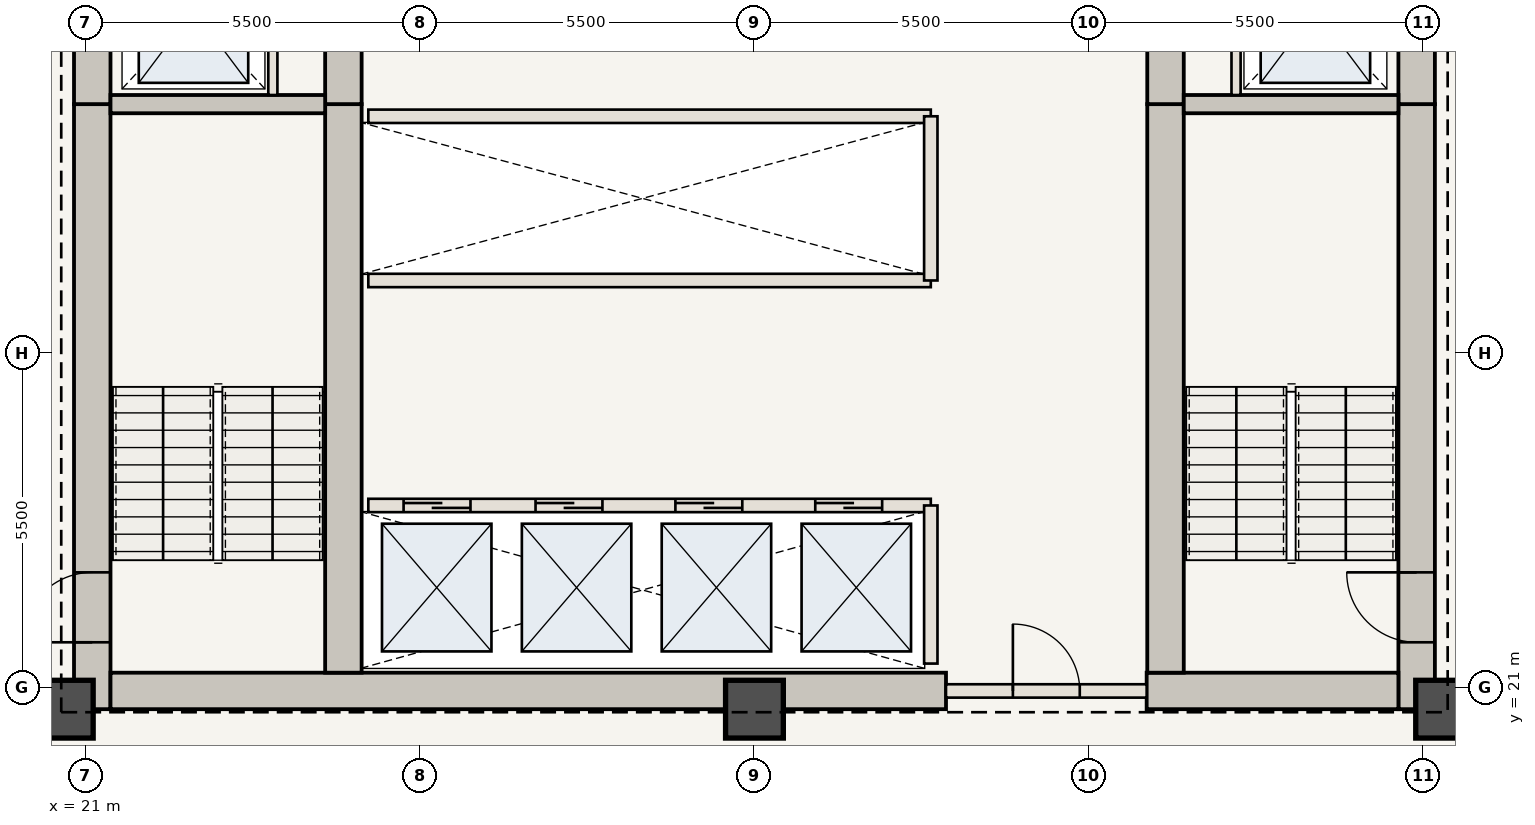
"""IFC4 building model, lengths in metres.
Left out: names, types, materials, properties, quantities, classifications, styles, units other than length and angle.
Written with IfcOpenShell. Run it as: python <this file> out.ifc"""

import sys

from ifc_helpers import new_model, si_unit, direction, frame, frame_2d, origin, origin_2d, place, context, subcontext, project, spatial, rectangle, extrude, element, fill, save


model = new_model("IFC4")
c1 = context("Model", 3, precision=1e-05, world=origin(), true_north=direction((0.0, 1.0)))
c2 = subcontext(c1, "Body", "Model", "MODEL_VIEW")
j1 = project(units=[si_unit("LENGTHUNIT", "METRE"), si_unit("PLANEANGLEUNIT", "RADIAN")], contexts=[c1])
p1 = place(None, origin())
s1 = spatial("IfcSite", under=j1, at=p1, CompositionType="ELEMENT")
p2 = place(p1, origin())
s2 = spatial("IfcBuilding", under=s1, at=p2, CompositionType="ELEMENT")
p3 = place(p2, frame((0.0, 0.0, 126.0)))
s3 = spatial("IfcBuildingStorey", under=s2, at=p3, CompositionType="ELEMENT", Elevation=126.0)
p4 = place(p3, frame((21.11, 20.65, 0.0), z_axis=(0.0, 0.0, 1.0), x_axis=(0.0, 1.0, 0.0)))
e1 = element("IfcWall", 1, at=p4, inside=s3, PredefinedType="SHEAR", context=c2, shape_type="SweptSolid", body=[
    extrude(rectangle(XDim=9.95, YDim=0.6, at=frame_2d((4.975, 0.0))), origin(), (0.0, 0.0, 1.0), 3.85),
])
p5 = place(p4, frame((1.1, 0.0, 0.0)))
e2 = element("IfcOpeningElement", 2, at=p5, cuts=e1, PredefinedType="OPENING", context=c2, shape_type="SweptSolid", body=[
    extrude(rectangle(XDim=1.15, YDim=2.15, at=frame_2d((0.575, 1.075))), frame((0.0, 0.31, 0.0), z_axis=(0.0, -1.0, 0.0), x_axis=(1.0, 0.0, 0.0)), (0.0, 0.0, 1.0), 0.62),
])
p6 = place(p3, frame((21.11, 30.6, 0.0), z_axis=(0.0, 0.0, 1.0), x_axis=(0.0, 1.0, 0.0)))
e3 = element("IfcWall", 3, at=p6, inside=s3, PredefinedType="SHEAR", context=c2, shape_type="SweptSolid", body=[
    extrude(rectangle(XDim=12.7, YDim=0.6, at=frame_2d((6.35, 0.0))), origin(), (0.0, 0.0, 1.0), 3.85),
])
p7 = place(p6, frame((4.2, 0.0, 0.0)))
e4 = element("IfcOpeningElement", 4, at=p7, cuts=e3, PredefinedType="OPENING", context=c2, shape_type="SweptSolid", body=[
    extrude(rectangle(XDim=1.1, YDim=2.15, at=frame_2d((0.55, 1.075))), frame((0.0, 0.31, 0.0), z_axis=(0.0, -1.0, 0.0), x_axis=(1.0, 0.0, 0.0)), (0.0, 0.0, 1.0), 0.62),
])
p8 = place(p6, frame((9.2, 0.0, 0.0)))
e5 = element("IfcOpeningElement", 5, at=p8, cuts=e3, PredefinedType="OPENING", context=c2, shape_type="SweptSolid", body=[
    extrude(rectangle(XDim=0.92, YDim=2.1, at=frame_2d((0.46, 1.05))), frame((0.0, 0.31, 0.0), z_axis=(0.0, -1.0, 0.0), x_axis=(1.0, 0.0, 0.0)), (0.0, 0.0, 1.0), 0.62),
])
p9 = place(p3, frame((42.89, 20.65, 0.0), z_axis=(0.0, 0.0, 1.0), x_axis=(0.0, 1.0, 0.0)))
e6 = element("IfcWall", 6, at=p9, inside=s3, PredefinedType="SHEAR", context=c2, shape_type="SweptSolid", body=[
    extrude(rectangle(XDim=9.95, YDim=0.6, at=frame_2d((4.975, 0.0))), origin(), (0.0, 0.0, 1.0), 3.85),
])
p10 = place(p9, frame((1.1, 0.0, 0.0)))
e7 = element("IfcOpeningElement", 7, at=p10, cuts=e6, PredefinedType="OPENING", context=c2, shape_type="SweptSolid", body=[
    extrude(rectangle(XDim=1.15, YDim=2.15, at=frame_2d((0.575, 1.075))), frame((0.0, 0.31, 0.0), z_axis=(0.0, -1.0, 0.0), x_axis=(1.0, 0.0, 0.0)), (0.0, 0.0, 1.0), 0.62),
])
p11 = place(p3, frame((42.89, 30.6, 0.0), z_axis=(0.0, 0.0, 1.0), x_axis=(0.0, 1.0, 0.0)))
e8 = element("IfcWall", 8, at=p11, inside=s3, PredefinedType="SHEAR", context=c2, shape_type="SweptSolid", body=[
    extrude(rectangle(XDim=12.7, YDim=0.6, at=frame_2d((6.35, 0.0))), origin(), (0.0, 0.0, 1.0), 3.85),
])
p12 = place(p11, frame((4.2, 0.0, 0.0)))
e9 = element("IfcOpeningElement", 9, at=p12, cuts=e8, PredefinedType="OPENING", context=c2, shape_type="SweptSolid", body=[
    extrude(rectangle(XDim=1.1, YDim=2.15, at=frame_2d((0.55, 1.075))), frame((0.0, 0.31, 0.0), z_axis=(0.0, -1.0, 0.0), x_axis=(1.0, 0.0, 0.0)), (0.0, 0.0, 1.0), 0.62),
])
p13 = place(p11, frame((8.05, 0.0, 0.0)))
e10 = element("IfcOpeningElement", 10, at=p13, cuts=e8, PredefinedType="OPENING", context=c2, shape_type="SweptSolid", body=[
    extrude(rectangle(XDim=0.88, YDim=2.1, at=frame_2d((0.44, 1.05))), frame((0.0, 0.31, 0.0), z_axis=(0.0, -1.0, 0.0), x_axis=(1.0, 0.0, 0.0)), (0.0, 0.0, 1.0), 0.62),
])
p14 = place(p11, frame((9.45, 0.0, 0.0)))
e11 = element("IfcOpeningElement", 11, at=p14, cuts=e8, PredefinedType="OPENING", context=c2, shape_type="SweptSolid", body=[
    extrude(rectangle(XDim=0.88, YDim=2.1, at=frame_2d((0.44, 1.05))), frame((0.0, 0.31, 0.0), z_axis=(0.0, -1.0, 0.0), x_axis=(1.0, 0.0, 0.0)), (0.0, 0.0, 1.0), 0.62),
])
p15 = place(p11, frame((10.85, 0.0, 0.0)))
e12 = element("IfcOpeningElement", 12, at=p15, cuts=e8, PredefinedType="OPENING", context=c2, shape_type="SweptSolid", body=[
    extrude(rectangle(XDim=0.88, YDim=2.1, at=frame_2d((0.44, 1.05))), frame((0.0, 0.31, 0.0), z_axis=(0.0, -1.0, 0.0), x_axis=(1.0, 0.0, 0.0)), (0.0, 0.0, 1.0), 0.62),
])
p16 = place(p3, frame((21.41, 20.95, 0.0), z_axis=(0.0, 0.0, 1.0), x_axis=(1.0, 0.0, 0.0)))
e13 = element("IfcWall", 13, at=p16, inside=s3, PredefinedType="SHEAR", context=c2, shape_type="SweptSolid", body=[
    extrude(rectangle(XDim=13.74, YDim=0.6, at=frame_2d((6.87, 0.0))), origin(), (0.0, 0.0, 1.0), 3.85),
])
p17 = place(p3, frame((38.45, 20.95, 0.0), z_axis=(0.0, 0.0, 1.0), x_axis=(1.0, 0.0, 0.0)))
e14 = element("IfcWall", 14, at=p17, inside=s3, PredefinedType="SHEAR", context=c2, shape_type="SweptSolid", body=[
    extrude(rectangle(XDim=4.14, YDim=0.6, at=frame_2d((2.07, 0.0))), origin(), (0.0, 0.0, 1.0), 3.85),
])
p18 = place(p3, frame((25.24, 21.25, 0.0), z_axis=(0.0, 0.0, 1.0), x_axis=(0.0, 1.0, 0.0)))
e15 = element("IfcWall", 15, at=p18, inside=s3, PredefinedType="SHEAR", context=c2, shape_type="SweptSolid", body=[
    extrude(rectangle(XDim=9.35, YDim=0.6, at=frame_2d((4.675, 0.0))), origin(), (0.0, 0.0, 1.0), 3.85),
])
p19 = place(p3, frame((25.24, 30.6, 0.0), z_axis=(0.0, 0.0, 1.0), x_axis=(0.0, 1.0, 0.0)))
e16 = element("IfcWall", 16, at=p19, inside=s3, PredefinedType="SHEAR", context=c2, shape_type="SweptSolid", body=[
    extrude(rectangle(XDim=12.1, YDim=0.6, at=frame_2d((6.05, 0.0))), origin(), (0.0, 0.0, 1.0), 3.85),
])
p20 = place(p19, frame((6.25, 0.0, 0.0)))
e17 = element("IfcOpeningElement", 17, at=p20, cuts=e16, PredefinedType="OPENING", context=c2, shape_type="SweptSolid", body=[
    extrude(rectangle(XDim=1.1, YDim=2.15, at=frame_2d((0.55, 1.075))), frame((0.0, 0.31, 0.0), z_axis=(0.0, -1.0, 0.0), x_axis=(1.0, 0.0, 0.0)), (0.0, 0.0, 1.0), 0.62),
])
p21 = place(p3, frame((38.76, 21.25, 0.0), z_axis=(0.0, 0.0, 1.0), x_axis=(0.0, 1.0, 0.0)))
e18 = element("IfcWall", 18, at=p21, inside=s3, PredefinedType="SHEAR", context=c2, shape_type="SweptSolid", body=[
    extrude(rectangle(XDim=9.35, YDim=0.6, at=frame_2d((4.675, 0.0))), origin(), (0.0, 0.0, 1.0), 3.85),
])
p22 = place(p3, frame((38.76, 30.6, 0.0), z_axis=(0.0, 0.0, 1.0), x_axis=(0.0, 1.0, 0.0)))
e19 = element("IfcWall", 19, at=p22, inside=s3, PredefinedType="SHEAR", context=c2, shape_type="SweptSolid", body=[
    extrude(rectangle(XDim=12.1, YDim=0.6, at=frame_2d((6.05, 0.0))), origin(), (0.0, 0.0, 1.0), 3.85),
])
for number, where, z_axis, x_axis in (
    (20, (20.65, 20.65, 0.0), (0.0, 0.0, 1.0), (1.0, 0.0, 0.0)),
    (21, (32.0, 20.65, 0.0), (0.0, 0.0, 1.0), (1.0, 0.0, 0.0)),
    (22, (43.35, 20.65, 0.0), (0.0, 0.0, 1.0), (1.0, 0.0, 0.0)),
):
    element("IfcColumn", number, at=place(p3, frame(where, z_axis=z_axis, x_axis=x_axis)), inside=s3, PredefinedType="COLUMN", context=c2, shape_type="SweptSolid", body=[
        extrude(rectangle(XDim=0.95, YDim=0.95, at=origin_2d()), origin(), (0.0, 0.0, 1.0), 3.85),
    ])
for number, where, z_axis, x_axis in (
    (23, (21.41, 30.6, 0.0), (0.0, 0.0, 1.0), (1.0, 0.0, 0.0)),
    (24, (39.06, 30.6, 0.0), (0.0, 0.0, 1.0), (1.0, 0.0, 0.0)),
):
    element("IfcWall", number, at=place(p3, frame(where, z_axis=z_axis, x_axis=x_axis)), inside=s3, PredefinedType="SHEAR", context=c2, shape_type="SweptSolid", body=[
        extrude(rectangle(XDim=3.53, YDim=0.3, at=frame_2d((1.765, 0.0))), origin(), (0.0, 0.0, 1.0), 3.685),
    ])
for number, where, z_axis, x_axis in (
    (25, (24.08, 30.75, 0.0), (0.0, 0.0, 1.0), (0.0, 1.0, 0.0)),
    (26, (39.92, 30.75, 0.0), (0.0, 0.0, 1.0), (0.0, 1.0, 0.0)),
):
    element("IfcWall", number, at=place(p3, frame(where, z_axis=z_axis, x_axis=x_axis)), inside=s3, PredefinedType="STANDARD", context=c2, shape_type="SweptSolid", body=[
        extrude(rectangle(XDim=2.65, YDim=0.15, at=frame_2d((1.325, 0.0))), origin(), (0.0, 0.0, 1.0), 3.685),
    ])
p23 = place(p3, frame((35.15, 20.95, 0.0), z_axis=(0.0, 0.0, 1.0), x_axis=(1.0, 0.0, 0.0)))
e27 = element("IfcWall", 27, at=p23, inside=s3, PredefinedType="STANDARD", context=c2, shape_type="SweptSolid", body=[
    extrude(rectangle(XDim=3.3, YDim=0.22, at=frame_2d((1.65, 0.0))), origin(), (0.0, 0.0, 1.0), 3.685),
])
p24 = place(p23, frame((1.1, 0.0, 0.0)))
e28 = element("IfcOpeningElement", 28, at=p24, cuts=e27, PredefinedType="OPENING", context=c2, shape_type="SweptSolid", body=[
    extrude(rectangle(XDim=1.1, YDim=2.15, at=frame_2d((0.55, 1.075))), frame((0.0, 0.12, 0.0), z_axis=(0.0, -1.0, 0.0), x_axis=(1.0, 0.0, 0.0)), (0.0, 0.0, 1.0), 0.24),
])
p25 = place(p3, frame((25.65, 24.0, 0.0), z_axis=(0.0, 0.0, 1.0), x_axis=(1.0, 0.0, 0.0)))
e29 = element("IfcWall", 29, at=p25, inside=s3, PredefinedType="STANDARD", context=c2, shape_type="SweptSolid", body=[
    extrude(rectangle(XDim=9.25, YDim=0.22, at=frame_2d((4.625, 0.0))), origin(), (0.0, 0.0, 1.0), 3.685),
])
p26 = place(p25, frame((0.58, 0.0, 0.0)))
e30 = element("IfcOpeningElement", 30, at=p26, cuts=e29, PredefinedType="OPENING", context=c2, shape_type="SweptSolid", body=[
    extrude(rectangle(XDim=1.1, YDim=2.15, at=frame_2d((0.55, 1.075))), frame((0.0, 0.12, 0.0), z_axis=(0.0, -1.0, 0.0), x_axis=(1.0, 0.0, 0.0)), (0.0, 0.0, 1.0), 0.24),
])
p27 = place(p25, frame((2.75, 0.0, 0.0)))
e31 = element("IfcOpeningElement", 31, at=p27, cuts=e29, PredefinedType="OPENING", context=c2, shape_type="SweptSolid", body=[
    extrude(rectangle(XDim=1.1, YDim=2.15, at=frame_2d((0.55, 1.075))), frame((0.0, 0.12, 0.0), z_axis=(0.0, -1.0, 0.0), x_axis=(1.0, 0.0, 0.0)), (0.0, 0.0, 1.0), 0.24),
])
p28 = place(p25, frame((5.05, 0.0, 0.0)))
e32 = element("IfcOpeningElement", 32, at=p28, cuts=e29, PredefinedType="OPENING", context=c2, shape_type="SweptSolid", body=[
    extrude(rectangle(XDim=1.1, YDim=2.15, at=frame_2d((0.55, 1.075))), frame((0.0, 0.12, 0.0), z_axis=(0.0, -1.0, 0.0), x_axis=(1.0, 0.0, 0.0)), (0.0, 0.0, 1.0), 0.24),
])
p29 = place(p25, frame((7.35, 0.0, 0.0)))
e33 = element("IfcOpeningElement", 33, at=p29, cuts=e29, PredefinedType="OPENING", context=c2, shape_type="SweptSolid", body=[
    extrude(rectangle(XDim=1.1, YDim=2.15, at=frame_2d((0.55, 1.075))), frame((0.0, 0.12, 0.0), z_axis=(0.0, -1.0, 0.0), x_axis=(1.0, 0.0, 0.0)), (0.0, 0.0, 1.0), 0.24),
])
p30 = place(p3, frame((34.9, 21.4, 0.0), z_axis=(0.0, 0.0, 1.0), x_axis=(0.0, 1.0, 0.0)))
e34 = element("IfcWall", 34, at=p30, inside=s3, PredefinedType="STANDARD", context=c2, shape_type="SweptSolid", body=[
    extrude(rectangle(XDim=2.6, YDim=0.22, at=frame_2d((1.3, 0.0))), origin(), (0.0, 0.0, 1.0), 3.685),
])
for number, where, z_axis, x_axis in (
    (35, (25.65, 27.7, 0.0), (0.0, 0.0, 1.0), (1.0, 0.0, 0.0)),
    (36, (25.65, 30.4, 0.0), (0.0, 0.0, 1.0), (1.0, 0.0, 0.0)),
):
    element("IfcWall", number, at=place(p3, frame(where, z_axis=z_axis, x_axis=x_axis)), inside=s3, PredefinedType="STANDARD", context=c2, shape_type="SweptSolid", body=[
        extrude(rectangle(XDim=9.25, YDim=0.22, at=frame_2d((4.625, 0.0))), origin(), (0.0, 0.0, 1.0), 3.685),
    ])
p31 = place(p3, frame((34.9, 27.7, 0.0), z_axis=(0.0, 0.0, 1.0), x_axis=(0.0, 1.0, 0.0)))
e37 = element("IfcWall", 37, at=p31, inside=s3, PredefinedType="STANDARD", context=c2, shape_type="SweptSolid", body=[
    extrude(rectangle(XDim=2.7, YDim=0.22, at=frame_2d((1.35, 0.0))), origin(), (0.0, 0.0, 1.0), 3.685),
])
p32 = place(p5, origin())
e38 = element("IfcDoor", 38, at=p32, inside=s3, OperationType="SINGLE_SWING_LEFT", PredefinedType="DOOR", context=c2, shape_type="SweptSolid", body=[
    extrude(rectangle(XDim=1.15, YDim=2.15, at=frame_2d((0.575, 1.075))), frame((0.0, 0.025, 0.0), z_axis=(0.0, -1.0, 0.0), x_axis=(1.0, 0.0, 0.0)), (0.0, 0.0, 1.0), 0.05),
])
fill(e2, e38)
p33 = place(p10, origin())
e39 = element("IfcDoor", 39, at=p33, inside=s3, OperationType="SINGLE_SWING_RIGHT", PredefinedType="DOOR", context=c2, shape_type="SweptSolid", body=[
    extrude(rectangle(XDim=1.15, YDim=2.15, at=frame_2d((0.575, 1.075))), frame((0.0, 0.025, 0.0), z_axis=(0.0, -1.0, 0.0), x_axis=(1.0, 0.0, 0.0)), (0.0, 0.0, 1.0), 0.05),
])
fill(e7, e39)
p34 = place(p24, origin())
e40 = element("IfcDoor", 40, at=p34, inside=s3, OperationType="SINGLE_SWING_LEFT", PredefinedType="DOOR", context=c2, shape_type="SweptSolid", body=[
    extrude(rectangle(XDim=1.1, YDim=2.15, at=frame_2d((0.55, 1.075))), frame((0.0, 0.025, 0.0), z_axis=(0.0, -1.0, 0.0), x_axis=(1.0, 0.0, 0.0)), (0.0, 0.0, 1.0), 0.05),
])
fill(e28, e40)
p35 = place(p26, origin())
e41 = element("IfcDoor", 41, at=p35, inside=s3, OperationType="DOUBLE_DOOR_SLIDING", PredefinedType="DOOR", context=c2, shape_type="SweptSolid", body=[
    extrude(rectangle(XDim=1.1, YDim=2.15, at=frame_2d((0.55, 1.075))), frame((0.0, 0.025, 0.0), z_axis=(0.0, -1.0, 0.0), x_axis=(1.0, 0.0, 0.0)), (0.0, 0.0, 1.0), 0.05),
])
fill(e30, e41)
p36 = place(p27, origin())
e42 = element("IfcDoor", 42, at=p36, inside=s3, OperationType="DOUBLE_DOOR_SLIDING", PredefinedType="DOOR", context=c2, shape_type="SweptSolid", body=[
    extrude(rectangle(XDim=1.1, YDim=2.15, at=frame_2d((0.55, 1.075))), frame((0.0, 0.025, 0.0), z_axis=(0.0, -1.0, 0.0), x_axis=(1.0, 0.0, 0.0)), (0.0, 0.0, 1.0), 0.05),
])
fill(e31, e42)
p37 = place(p28, origin())
e43 = element("IfcDoor", 43, at=p37, inside=s3, OperationType="DOUBLE_DOOR_SLIDING", PredefinedType="DOOR", context=c2, shape_type="SweptSolid", body=[
    extrude(rectangle(XDim=1.1, YDim=2.15, at=frame_2d((0.55, 1.075))), frame((0.0, 0.025, 0.0), z_axis=(0.0, -1.0, 0.0), x_axis=(1.0, 0.0, 0.0)), (0.0, 0.0, 1.0), 0.05),
])
fill(e32, e43)
p38 = place(p29, origin())
e44 = element("IfcDoor", 44, at=p38, inside=s3, OperationType="DOUBLE_DOOR_SLIDING", PredefinedType="DOOR", context=c2, shape_type="SweptSolid", body=[
    extrude(rectangle(XDim=1.1, YDim=2.15, at=frame_2d((0.55, 1.075))), frame((0.0, 0.025, 0.0), z_axis=(0.0, -1.0, 0.0), x_axis=(1.0, 0.0, 0.0)), (0.0, 0.0, 1.0), 0.05),
])
fill(e33, e44)
save(model, sys.argv[1])
